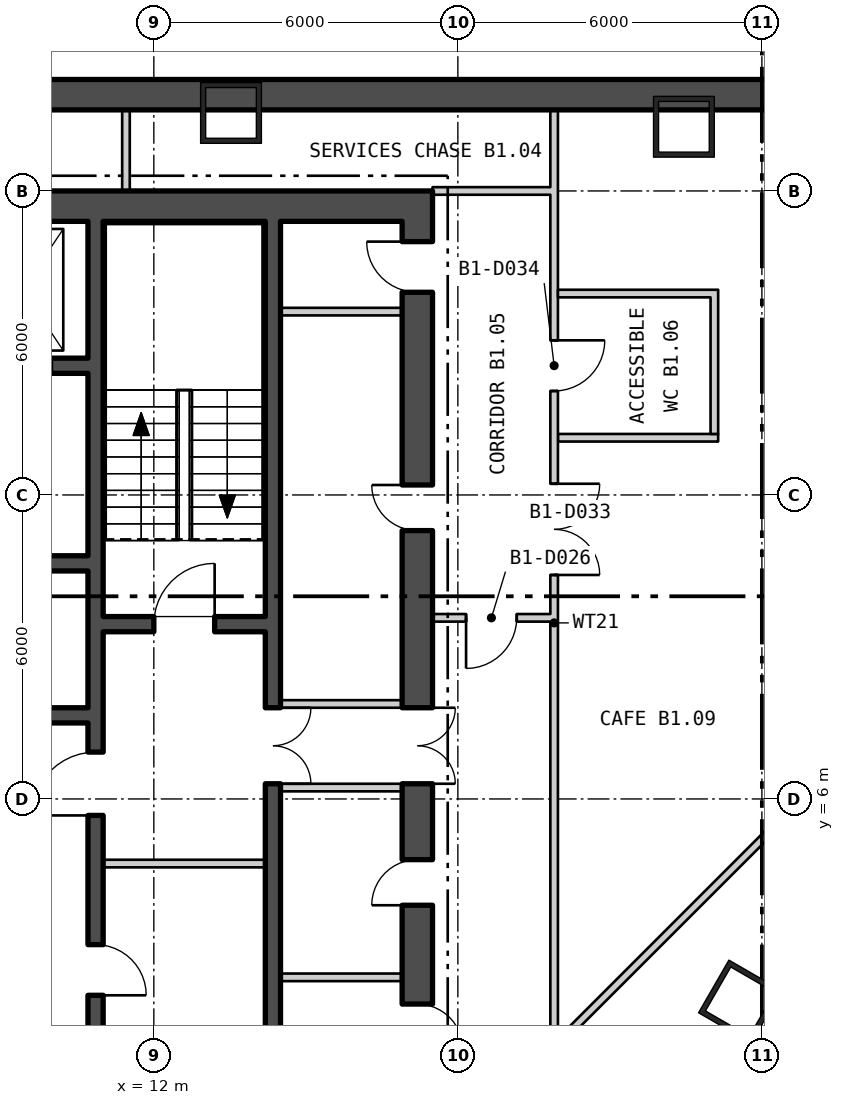
"""IFC4 building model, lengths in metres.
Left out: names, types, materials, properties, quantities, classifications, styles, units other than length and angle.
Written with IfcOpenShell. Run it as: python <this file> out.ifc"""

import sys

from ifc_helpers import new_model, si_unit, direction, frame, frame_2d, origin, origin_2d, place, context, subcontext, project, spatial, rectangle, hollow_rectangle, extrude, element, fill, save


model = new_model("IFC4")
c1 = context("Model", 3, precision=1e-05, world=origin(), true_north=direction((0.0, 1.0)))
c2 = subcontext(c1, "Body", "Model", "MODEL_VIEW")
j1 = project(units=[si_unit("LENGTHUNIT", "METRE"), si_unit("PLANEANGLEUNIT", "RADIAN")], contexts=[c1])
p1 = place(None, origin())
s1 = spatial("IfcSite", under=j1, at=p1, CompositionType="ELEMENT")
p2 = place(p1, origin())
s2 = spatial("IfcBuilding", under=s1, at=p2, CompositionType="ELEMENT")
p3 = place(p2, frame((0.0, 0.0, -5.7)))
s3 = spatial("IfcBuildingStorey", under=s2, at=p3, CompositionType="ELEMENT", Elevation=-5.7)
for number, where, z_axis, x_axis in (
    (1, (22.461, 19.267, 0.0), (0.0, 0.0, 1.0), (-1.0, 0.0, 0.0)),
    (2, (13.523, 19.54, 0.0), (0.0, 0.0, 1.0), (-1.0, 0.0, 0.0)),
    (3, (23.569, 2.0, 0.0), (0.0, 0.0, 1.0), (0.5, 0.866, 0.0)),
):
    element("IfcColumn", number, at=place(p3, frame(where, z_axis=z_axis, x_axis=x_axis)), inside=s3, PredefinedType="COLUMN", context=c2, shape_type="SweptSolid", body=[
        extrude(hollow_rectangle(XDim=1.2, YDim=1.2, WallThickness=0.1, at=origin_2d()), origin(), (0.0, 0.0, 1.0), 5.7),
    ])
p4 = place(p3, frame((-39.0, 19.9, -0.4), z_axis=(0.0, 0.0, 1.0), x_axis=(1.0, 0.0, 0.0)))
e4 = element("IfcWall", 4, at=p4, inside=s3, PredefinedType="STANDARD", context=c2, shape_type="SweptSolid", body=[
    extrude(rectangle(XDim=78.0, YDim=0.6, at=frame_2d((39.0, 0.0))), origin(), (0.0, 0.0, 1.0), 5.7),
])
p5 = place(p3, frame((-17.5, 17.7, 0.0), z_axis=(0.0, 0.0, 1.0), x_axis=(1.0, 0.0, 0.0)))
e5 = element("IfcWall", 5, at=p5, inside=s3, PredefinedType="SHEAR", context=c2, shape_type="SweptSolid", body=[
    extrude(rectangle(XDim=35.0, YDim=0.6, at=frame_2d((17.5, 0.0))), origin(), (0.0, 0.0, 1.0), 5.25),
])
p6 = place(p3, frame((17.2, 0.6, 0.0), z_axis=(0.0, 0.0, 1.0), x_axis=(0.0, 1.0, 0.0)))
e6 = element("IfcWall", 6, at=p6, inside=s3, PredefinedType="SHEAR", context=c2, shape_type="SweptSolid", body=[
    extrude(rectangle(XDim=16.8, YDim=0.6, at=frame_2d((8.4, 0.0))), origin(), (0.0, 0.0, 1.0), 5.25),
])
p7 = place(p6, frame((5.7, 0.0, 0.0)))
e7 = element("IfcOpeningElement", 7, at=p7, cuts=e6, PredefinedType="OPENING", context=c2, shape_type="SweptSolid", body=[
    extrude(rectangle(XDim=1.5, YDim=2.1, at=frame_2d((0.75, 1.05))), frame((0.0, 0.31, 0.0), z_axis=(0.0, -1.0, 0.0), x_axis=(1.0, 0.0, 0.0)), (0.0, 0.0, 1.0), 0.62),
])
p8 = place(p6, frame((0.452, 0.0, 0.0)))
e8 = element("IfcOpeningElement", 8, at=p8, cuts=e6, PredefinedType="OPENING", context=c2, shape_type="SweptSolid", body=[
    extrude(rectangle(XDim=0.9, YDim=2.1, at=frame_2d((0.45, 1.05))), frame((0.0, 0.31, 0.0), z_axis=(0.0, -1.0, 0.0), x_axis=(1.0, 0.0, 0.0)), (0.0, 0.0, 1.0), 0.62),
])
p9 = place(p6, frame((3.302, 0.0, 0.0)))
e9 = element("IfcOpeningElement", 9, at=p9, cuts=e6, PredefinedType="OPENING", context=c2, shape_type="SweptSolid", body=[
    extrude(rectangle(XDim=0.9, YDim=2.1, at=frame_2d((0.45, 1.05))), frame((0.0, 0.31, 0.0), z_axis=(0.0, -1.0, 0.0), x_axis=(1.0, 0.0, 0.0)), (0.0, 0.0, 1.0), 0.62),
])
p10 = place(p6, frame((10.697, 0.0, 0.0)))
e10 = element("IfcOpeningElement", 10, at=p10, cuts=e6, PredefinedType="OPENING", context=c2, shape_type="SweptSolid", body=[
    extrude(rectangle(XDim=0.9, YDim=2.1, at=frame_2d((0.45, 1.05))), frame((0.0, 0.31, 0.0), z_axis=(0.0, -1.0, 0.0), x_axis=(1.0, 0.0, 0.0)), (0.0, 0.0, 1.0), 0.62),
])
p11 = place(p6, frame((15.4, 0.0, 0.0)))
e11 = element("IfcOpeningElement", 11, at=p11, cuts=e6, PredefinedType="OPENING", context=c2, shape_type="SweptSolid", body=[
    extrude(rectangle(XDim=1.0, YDim=2.1, at=frame_2d((0.5, 1.05))), frame((0.0, 0.31, 0.0), z_axis=(0.0, -1.0, 0.0), x_axis=(1.0, 0.0, 0.0)), (0.0, 0.0, 1.0), 0.62),
])
p12 = place(p3, frame((10.85, 0.6, 0.0), z_axis=(0.0, 0.0, 1.0), x_axis=(0.0, 1.0, 0.0)))
e12 = element("IfcWall", 12, at=p12, inside=s3, PredefinedType="SHEAR", context=c2, shape_type="SweptSolid", body=[
    extrude(rectangle(XDim=16.8, YDim=0.3, at=frame_2d((8.4, 0.0))), origin(), (0.0, 0.0, 1.0), 5.25),
])
p13 = place(p12, frame((5.075, 0.0, 0.0)))
e13 = element("IfcOpeningElement", 13, at=p13, cuts=e12, PredefinedType="OPENING", context=c2, shape_type="SweptSolid", body=[
    extrude(rectangle(XDim=1.25, YDim=2.1, at=frame_2d((0.625, 1.05))), frame((0.0, 0.16, 0.0), z_axis=(0.0, -1.0, 0.0), x_axis=(1.0, 0.0, 0.0)), (0.0, 0.0, 1.0), 0.32),
])
p14 = place(p12, frame((1.525, 0.0, 0.0)))
e14 = element("IfcOpeningElement", 14, at=p14, cuts=e12, PredefinedType="OPENING", context=c2, shape_type="SweptSolid", body=[
    extrude(rectangle(XDim=1.0, YDim=2.1, at=frame_2d((0.5, 1.05))), frame((0.0, 0.16, 0.0), z_axis=(0.0, -1.0, 0.0), x_axis=(1.0, 0.0, 0.0)), (0.0, 0.0, 1.0), 0.32),
])
p15 = place(p3, frame((14.35, 0.6, 0.0), z_axis=(0.0, 0.0, 1.0), x_axis=(0.0, 1.0, 0.0)))
e15 = element("IfcWall", 15, at=p15, inside=s3, PredefinedType="SHEAR", context=c2, shape_type="SweptSolid", body=[
    extrude(rectangle(XDim=16.8, YDim=0.3, at=frame_2d((8.4, 0.0))), origin(), (0.0, 0.0, 1.0), 5.25),
])
p16 = place(p15, frame((5.7, 0.0, 0.0)))
e16 = element("IfcOpeningElement", 16, at=p16, cuts=e15, PredefinedType="OPENING", context=c2, shape_type="SweptSolid", body=[
    extrude(rectangle(XDim=1.5, YDim=2.1, at=frame_2d((0.75, 1.05))), frame((0.0, 0.16, 0.0), z_axis=(0.0, -1.0, 0.0), x_axis=(1.0, 0.0, 0.0)), (0.0, 0.0, 1.0), 0.32),
])
p17 = place(p3, frame((11.0, 9.45, 0.0), z_axis=(0.0, 0.0, 1.0), x_axis=(1.0, 0.0, 0.0)))
e17 = element("IfcWall", 17, at=p17, inside=s3, PredefinedType="SHEAR", context=c2, shape_type="SweptSolid", body=[
    extrude(rectangle(XDim=3.2, YDim=0.3, at=frame_2d((1.6, 0.0))), origin(), (0.0, 0.0, 1.0), 5.25),
])
p18 = place(p17, frame((1.0, 0.0, 0.0)))
e18 = element("IfcOpeningElement", 18, at=p18, cuts=e17, PredefinedType="OPENING", context=c2, shape_type="SweptSolid", body=[
    extrude(rectangle(XDim=1.2, YDim=2.1, at=frame_2d((0.6, 1.05))), frame((0.0, 0.16, 0.0), z_axis=(0.0, -1.0, 0.0), x_axis=(1.0, 0.0, 0.0)), (0.0, 0.0, 1.0), 0.32),
])
p19 = place(p3, frame((-10.7, 14.55, 0.0), z_axis=(0.0, 0.0, 1.0), x_axis=(1.0, 0.0, 0.0)))
e19 = element("IfcWall", 19, at=p19, inside=s3, PredefinedType="SHEAR", context=c2, shape_type="SweptSolid", body=[
    extrude(rectangle(XDim=21.4, YDim=0.3, at=frame_2d((10.7, 0.0))), origin(), (0.0, 0.0, 1.0), 5.25),
])
p20 = place(p19, frame((0.738, 0.0, 0.0)))
e20 = element("IfcOpeningElement", 20, at=p20, cuts=e19, PredefinedType="OPENING", context=c2, shape_type="SweptSolid", body=[
    extrude(rectangle(XDim=1.1, YDim=2.1, at=frame_2d((0.55, 1.05))), frame((0.0, 0.16, 0.0), z_axis=(0.0, -1.0, 0.0), x_axis=(1.0, 0.0, 0.0)), (0.0, 0.0, 1.0), 0.32),
])
p21 = place(p19, frame((3.462, 0.0, 0.0)))
e21 = element("IfcOpeningElement", 21, at=p21, cuts=e19, PredefinedType="OPENING", context=c2, shape_type="SweptSolid", body=[
    extrude(rectangle(XDim=1.1, YDim=2.1, at=frame_2d((0.55, 1.05))), frame((0.0, 0.16, 0.0), z_axis=(0.0, -1.0, 0.0), x_axis=(1.0, 0.0, 0.0)), (0.0, 0.0, 1.0), 0.32),
])
p22 = place(p19, frame((6.138, 0.0, 0.0)))
e22 = element("IfcOpeningElement", 22, at=p22, cuts=e19, PredefinedType="OPENING", context=c2, shape_type="SweptSolid", body=[
    extrude(rectangle(XDim=1.1, YDim=2.1, at=frame_2d((0.55, 1.05))), frame((0.0, 0.16, 0.0), z_axis=(0.0, -1.0, 0.0), x_axis=(1.0, 0.0, 0.0)), (0.0, 0.0, 1.0), 0.32),
])
p23 = place(p19, frame((14.162, 0.0, 0.0)))
e23 = element("IfcOpeningElement", 23, at=p23, cuts=e19, PredefinedType="OPENING", context=c2, shape_type="SweptSolid", body=[
    extrude(rectangle(XDim=1.1, YDim=2.1, at=frame_2d((0.55, 1.05))), frame((0.0, 0.16, 0.0), z_axis=(0.0, -1.0, 0.0), x_axis=(1.0, 0.0, 0.0)), (0.0, 0.0, 1.0), 0.32),
])
p24 = place(p19, frame((16.837, 0.0, 0.0)))
e24 = element("IfcOpeningElement", 24, at=p24, cuts=e19, PredefinedType="OPENING", context=c2, shape_type="SweptSolid", body=[
    extrude(rectangle(XDim=1.1, YDim=2.1, at=frame_2d((0.55, 1.05))), frame((0.0, 0.16, 0.0), z_axis=(0.0, -1.0, 0.0), x_axis=(1.0, 0.0, 0.0)), (0.0, 0.0, 1.0), 0.32),
])
p25 = place(p19, frame((19.562, 0.0, 0.0)))
e25 = element("IfcOpeningElement", 25, at=p25, cuts=e19, PredefinedType="OPENING", context=c2, shape_type="SweptSolid", body=[
    extrude(rectangle(XDim=1.1, YDim=2.1, at=frame_2d((0.55, 1.05))), frame((0.0, 0.16, 0.0), z_axis=(0.0, -1.0, 0.0), x_axis=(1.0, 0.0, 0.0)), (0.0, 0.0, 1.0), 0.32),
])
p26 = place(p19, frame((8.863, 0.0, 0.0)))
e26 = element("IfcOpeningElement", 26, at=p26, cuts=e19, PredefinedType="OPENING", context=c2, shape_type="SweptSolid", body=[
    extrude(rectangle(XDim=1.0, YDim=2.1, at=frame_2d((0.5, 1.05))), frame((0.0, 0.16, 0.0), z_axis=(0.0, -1.0, 0.0), x_axis=(1.0, 0.0, 0.0)), (0.0, 0.0, 1.0), 0.32),
])
p27 = place(p19, frame((11.537, 0.0, 0.0)))
e27 = element("IfcOpeningElement", 27, at=p27, cuts=e19, PredefinedType="OPENING", context=c2, shape_type="SweptSolid", body=[
    extrude(rectangle(XDim=1.0, YDim=2.1, at=frame_2d((0.5, 1.05))), frame((0.0, 0.16, 0.0), z_axis=(0.0, -1.0, 0.0), x_axis=(1.0, 0.0, 0.0)), (0.0, 0.0, 1.0), 0.32),
])
p28 = place(p3, frame((2.6, 10.65, 0.0), z_axis=(0.0, 0.0, 1.0), x_axis=(1.0, 0.0, 0.0)))
e28 = element("IfcWall", 28, at=p28, inside=s3, PredefinedType="SHEAR", context=c2, shape_type="SweptSolid", body=[
    extrude(rectangle(XDim=8.1, YDim=0.3, at=frame_2d((4.05, 0.0))), origin(), (0.0, 0.0, 1.0), 5.25),
])
p29 = place(p28, frame((3.65, 0.0, 0.0)))
e29 = element("IfcOpeningElement", 29, at=p29, cuts=e28, PredefinedType="OPENING", context=c2, shape_type="SweptSolid", body=[
    extrude(rectangle(XDim=1.0, YDim=2.1, at=frame_2d((0.5, 1.05))), frame((0.0, 0.16, 0.0), z_axis=(0.0, -1.0, 0.0), x_axis=(1.0, 0.0, 0.0)), (0.0, 0.0, 1.0), 0.32),
])
p30 = place(p3, frame((2.6, 7.65, 0.0), z_axis=(0.0, 0.0, 1.0), x_axis=(1.0, 0.0, 0.0)))
e30 = element("IfcWall", 30, at=p30, inside=s3, PredefinedType="SHEAR", context=c2, shape_type="SweptSolid", body=[
    extrude(rectangle(XDim=8.1, YDim=0.3, at=frame_2d((4.05, 0.0))), origin(), (0.0, 0.0, 1.0), 5.25),
])
p31 = place(p3, frame((11.0, 4.725, 0.0), z_axis=(0.0, 0.0, 1.0), x_axis=(1.0, 0.0, 0.0)))
e31 = element("IfcWall", 31, at=p31, inside=s3, PredefinedType="PARTITIONING", context=c2, shape_type="SweptSolid", body=[
    extrude(rectangle(XDim=3.2, YDim=0.15, at=frame_2d((1.6, 0.0))), origin(), (0.0, 0.0, 1.0), 5.25),
])
for number, where, z_axis, x_axis in (
    (32, (14.5, 6.225, 0.0), (0.0, 0.0, 1.0), (1.0, 0.0, 0.0)),
    (33, (14.5, 7.875, 0.0), (0.0, 0.0, 1.0), (1.0, 0.0, 0.0)),
    (34, (14.5, 2.479, 0.0), (0.0, 0.0, 1.0), (1.0, 0.0, 0.0)),
    (35, (14.5, 15.618, 0.0), (0.0, 0.0, 1.0), (1.0, 0.0, 0.0)),
):
    element("IfcWall", number, at=place(p3, frame(where, z_axis=z_axis, x_axis=x_axis)), inside=s3, PredefinedType="PARTITIONING", context=c2, shape_type="SweptSolid", body=[
        extrude(rectangle(XDim=2.4, YDim=0.15, at=frame_2d((1.2, 0.0))), origin(), (0.0, 0.0, 1.0), 5.25),
    ])
p32 = place(p3, frame((11.45, 18.0, 0.0), z_axis=(0.0, 0.0, 1.0), x_axis=(0.0, 1.0, 0.0)))
e36 = element("IfcWall", 36, at=p32, inside=s3, PredefinedType="PARTITIONING", context=c2, shape_type="SweptSolid", body=[
    extrude(rectangle(XDim=1.75, YDim=0.15, at=frame_2d((0.875, 0.0))), origin(), (0.0, 0.0, 1.0), 5.25),
])
p33 = place(p3, frame((17.5, 9.575, 0.0), z_axis=(0.0, 0.0, 1.0), x_axis=(1.0, 0.0, 0.0)))
e37 = element("IfcWall", 37, at=p33, inside=s3, PredefinedType="PARTITIONING", context=c2, shape_type="SweptSolid", body=[
    extrude(rectangle(XDim=2.325, YDim=0.15, at=frame_2d((1.163, 0.0))), origin(), (0.0, 0.0, 1.0), 5.25),
])
p34 = place(p33, frame((0.662, 0.0, 0.0)))
e38 = element("IfcOpeningElement", 38, at=p34, cuts=e37, PredefinedType="OPENING", context=c2, shape_type="SweptSolid", body=[
    extrude(rectangle(XDim=1.0, YDim=2.1, at=frame_2d((0.5, 1.05))), frame((0.0, 0.085, 0.0), z_axis=(0.0, -1.0, 0.0), x_axis=(1.0, 0.0, 0.0)), (0.0, 0.0, 1.0), 0.17),
])
p35 = place(p3, frame((17.5, 18.0, 0.0), z_axis=(0.0, 0.0, 1.0), x_axis=(1.0, 0.0, 0.0)))
e39 = element("IfcWall", 39, at=p35, inside=s3, PredefinedType="PARTITIONING", context=c2, shape_type="SweptSolid", body=[
    extrude(rectangle(XDim=2.475, YDim=0.15, at=frame_2d((1.238, 0.0))), origin(), (0.0, 0.0, 1.0), 5.25),
])
p36 = place(p3, frame((19.9, 1.025, 0.0), z_axis=(0.0, 0.0, 1.0), x_axis=(0.0, 1.0, 0.0)))
e40 = element("IfcWall", 40, at=p36, inside=s3, PredefinedType="PARTITIONING", context=c2, shape_type="SweptSolid", body=[
    extrude(rectangle(XDim=16.9, YDim=0.15, at=frame_2d((8.45, 0.0))), origin(), (0.0, 0.0, 1.0), 5.25),
])
p37 = place(p36, frame((9.396, 0.0, 0.0)))
e41 = element("IfcOpeningElement", 41, at=p37, cuts=e40, PredefinedType="OPENING", context=c2, shape_type="SweptSolid", body=[
    extrude(rectangle(XDim=1.8, YDim=2.1, at=frame_2d((0.9, 1.05))), frame((0.0, 0.085, 0.0), z_axis=(0.0, -1.0, 0.0), x_axis=(1.0, 0.0, 0.0)), (0.0, 0.0, 1.0), 0.17),
])
p38 = place(p36, frame((13.027, 0.0, 0.0)))
e42 = element("IfcOpeningElement", 42, at=p38, cuts=e40, PredefinedType="OPENING", context=c2, shape_type="SweptSolid", body=[
    extrude(rectangle(XDim=1.0, YDim=2.1, at=frame_2d((0.5, 1.05))), frame((0.0, 0.085, 0.0), z_axis=(0.0, -1.0, 0.0), x_axis=(1.0, 0.0, 0.0)), (0.0, 0.0, 1.0), 0.17),
])
p39 = place(p3, frame((19.9, 18.075, 0.0), z_axis=(0.0, 0.0, 1.0), x_axis=(0.0, 1.0, 0.0)))
e43 = element("IfcWall", 43, at=p39, inside=s3, PredefinedType="PARTITIONING", context=c2, shape_type="SweptSolid", body=[
    extrude(rectangle(XDim=1.675, YDim=0.15, at=frame_2d((0.838, 0.0))), origin(), (0.0, 0.0, 1.0), 5.25),
])
for number, where, z_axis, x_axis in (
    (44, (19.975, 13.129, 0.0), (0.0, 0.0, 1.0), (1.0, 0.0, 0.0)),
    (45, (19.975, 15.975, 0.0), (0.0, 0.0, 1.0), (1.0, 0.0, 0.0)),
):
    element("IfcWall", number, at=place(p3, frame(where, z_axis=z_axis, x_axis=x_axis)), inside=s3, PredefinedType="PARTITIONING", context=c2, shape_type="SweptSolid", body=[
        extrude(rectangle(XDim=3.162, YDim=0.15, at=frame_2d((1.581, 0.0))), origin(), (0.0, 0.0, 1.0), 5.25),
    ])
p40 = place(p3, frame((20.028, 1.228, 0.0), z_axis=(0.0, 0.0, 1.0), x_axis=(0.707106781187, 0.707106781187, 0.0)))
e46 = element("IfcWall", 46, at=p40, inside=s3, PredefinedType="PARTITIONING", context=c2, shape_type="SweptSolid", body=[
    extrude(rectangle(XDim=7.586, YDim=0.15, at=frame_2d((3.793, 0.0))), origin(), (0.0, 0.0, 1.0), 5.25),
])
p41 = place(p3, frame((23.062, 13.204, 0.0), z_axis=(0.0, 0.0, 1.0), x_axis=(0.0, 1.0, 0.0)))
e47 = element("IfcWall", 47, at=p41, inside=s3, PredefinedType="PARTITIONING", context=c2, shape_type="SweptSolid", body=[
    extrude(rectangle(XDim=2.696, YDim=0.15, at=frame_2d((1.348, 0.0))), origin(), (0.0, 0.0, 1.0), 5.25),
])
p42 = place(p18, origin())
e48 = element("IfcDoor", 48, at=p42, inside=s3, OperationType="SINGLE_SWING_LEFT", PredefinedType="DOOR", context=c2, shape_type="SweptSolid", body=[
    extrude(rectangle(XDim=1.2, YDim=2.1, at=frame_2d((0.6, 1.05))), frame((0.0, 0.025, 0.0), z_axis=(0.0, -1.0, 0.0), x_axis=(1.0, 0.0, 0.0)), (0.0, 0.0, 1.0), 0.05),
])
fill(e18, e48)
p43 = place(p13, origin())
e49 = element("IfcDoor", 49, at=p43, inside=s3, OperationType="SINGLE_SWING_RIGHT", PredefinedType="DOOR", context=c2, shape_type="SweptSolid", body=[
    extrude(rectangle(XDim=1.25, YDim=2.1, at=frame_2d((0.625, 1.05))), frame((0.0, 0.025, 0.0), z_axis=(0.0, -1.0, 0.0), x_axis=(1.0, 0.0, 0.0)), (0.0, 0.0, 1.0), 0.05),
])
fill(e13, e49)
p44 = place(p14, origin())
e50 = element("IfcDoor", 50, at=p44, inside=s3, OperationType="SINGLE_SWING_LEFT", PredefinedType="DOOR", context=c2, shape_type="SweptSolid", body=[
    extrude(rectangle(XDim=1.0, YDim=2.1, at=frame_2d((0.5, 1.05))), frame((0.0, 0.025, 0.0), z_axis=(0.0, -1.0, 0.0), x_axis=(1.0, 0.0, 0.0)), (0.0, 0.0, 1.0), 0.05),
])
fill(e14, e50)
p45 = place(p16, origin())
e51 = element("IfcDoor", 51, at=p45, inside=s3, OperationType="DOUBLE_DOOR_SINGLE_SWING", PredefinedType="DOOR", context=c2, shape_type="SweptSolid", body=[
    extrude(rectangle(XDim=1.5, YDim=2.1, at=frame_2d((0.75, 1.05))), frame((0.0, 0.025, 0.0), z_axis=(0.0, -1.0, 0.0), x_axis=(1.0, 0.0, 0.0)), (0.0, 0.0, 1.0), 0.05),
])
fill(e16, e51)
p46 = place(p7, origin())
e52 = element("IfcDoor", 52, at=p46, inside=s3, OperationType="DOUBLE_DOOR_SINGLE_SWING", PredefinedType="DOOR", context=c2, shape_type="SweptSolid", body=[
    extrude(rectangle(XDim=1.5, YDim=2.1, at=frame_2d((0.75, 1.05))), frame((0.0, 0.025, 0.0), z_axis=(0.0, -1.0, 0.0), x_axis=(1.0, 0.0, 0.0)), (0.0, 0.0, 1.0), 0.05),
])
fill(e7, e52)
p47 = place(p8, origin())
e53 = element("IfcDoor", 53, at=p47, inside=s3, OperationType="SINGLE_SWING_LEFT", PredefinedType="DOOR", context=c2, shape_type="SweptSolid", body=[
    extrude(rectangle(XDim=0.9, YDim=2.1, at=frame_2d((0.45, 1.05))), frame((0.0, 0.025, 0.0), z_axis=(0.0, -1.0, 0.0), x_axis=(1.0, 0.0, 0.0)), (0.0, 0.0, 1.0), 0.05),
])
fill(e8, e53)
p48 = place(p9, origin())
e54 = element("IfcDoor", 54, at=p48, inside=s3, OperationType="SINGLE_SWING_RIGHT", PredefinedType="DOOR", context=c2, shape_type="SweptSolid", body=[
    extrude(rectangle(XDim=0.9, YDim=2.1, at=frame_2d((0.45, 1.05))), frame((0.0, 0.025, 0.0), z_axis=(0.0, -1.0, 0.0), x_axis=(1.0, 0.0, 0.0)), (0.0, 0.0, 1.0), 0.05),
])
fill(e9, e54)
p49 = place(p10, origin())
e55 = element("IfcDoor", 55, at=p49, inside=s3, OperationType="SINGLE_SWING_LEFT", PredefinedType="DOOR", context=c2, shape_type="SweptSolid", body=[
    extrude(rectangle(XDim=0.9, YDim=2.1, at=frame_2d((0.45, 1.05))), frame((0.0, 0.025, 0.0), z_axis=(0.0, -1.0, 0.0), x_axis=(1.0, 0.0, 0.0)), (0.0, 0.0, 1.0), 0.05),
])
fill(e10, e55)
p50 = place(p11, origin())
e56 = element("IfcDoor", 56, at=p50, inside=s3, OperationType="SINGLE_SWING_LEFT", PredefinedType="DOOR", context=c2, shape_type="SweptSolid", body=[
    extrude(rectangle(XDim=1.0, YDim=2.1, at=frame_2d((0.5, 1.05))), frame((0.0, 0.025, 0.0), z_axis=(0.0, -1.0, 0.0), x_axis=(1.0, 0.0, 0.0)), (0.0, 0.0, 1.0), 0.05),
])
fill(e11, e56)
p51 = place(p34, origin())
e57 = element("IfcDoor", 57, at=p51, inside=s3, OperationType="SINGLE_SWING_LEFT", PredefinedType="DOOR", context=c2, shape_type="SweptSolid", body=[
    extrude(rectangle(XDim=1.0, YDim=2.1, at=frame_2d((0.5, 1.05))), frame((0.0, 0.025, 0.0), z_axis=(0.0, -1.0, 0.0), x_axis=(1.0, 0.0, 0.0)), (0.0, 0.0, 1.0), 0.05),
])
fill(e38, e57)
p52 = place(p37, origin())
e58 = element("IfcDoor", 58, at=p52, inside=s3, OperationType="DOUBLE_DOOR_SINGLE_SWING", PredefinedType="DOOR", context=c2, shape_type="SweptSolid", body=[
    extrude(rectangle(XDim=1.8, YDim=2.1, at=frame_2d((0.9, 1.05))), frame((0.0, 0.025, 0.0), z_axis=(0.0, -1.0, 0.0), x_axis=(1.0, 0.0, 0.0)), (0.0, 0.0, 1.0), 0.05),
])
fill(e41, e58)
p53 = place(p38, origin())
e59 = element("IfcDoor", 59, at=p53, inside=s3, OperationType="SINGLE_SWING_RIGHT", PredefinedType="DOOR", context=c2, shape_type="SweptSolid", body=[
    extrude(rectangle(XDim=1.0, YDim=2.1, at=frame_2d((0.5, 1.05))), frame((0.0, 0.025, 0.0), z_axis=(0.0, -1.0, 0.0), x_axis=(1.0, 0.0, 0.0)), (0.0, 0.0, 1.0), 0.05),
])
fill(e42, e59)
save(model, sys.argv[1])
